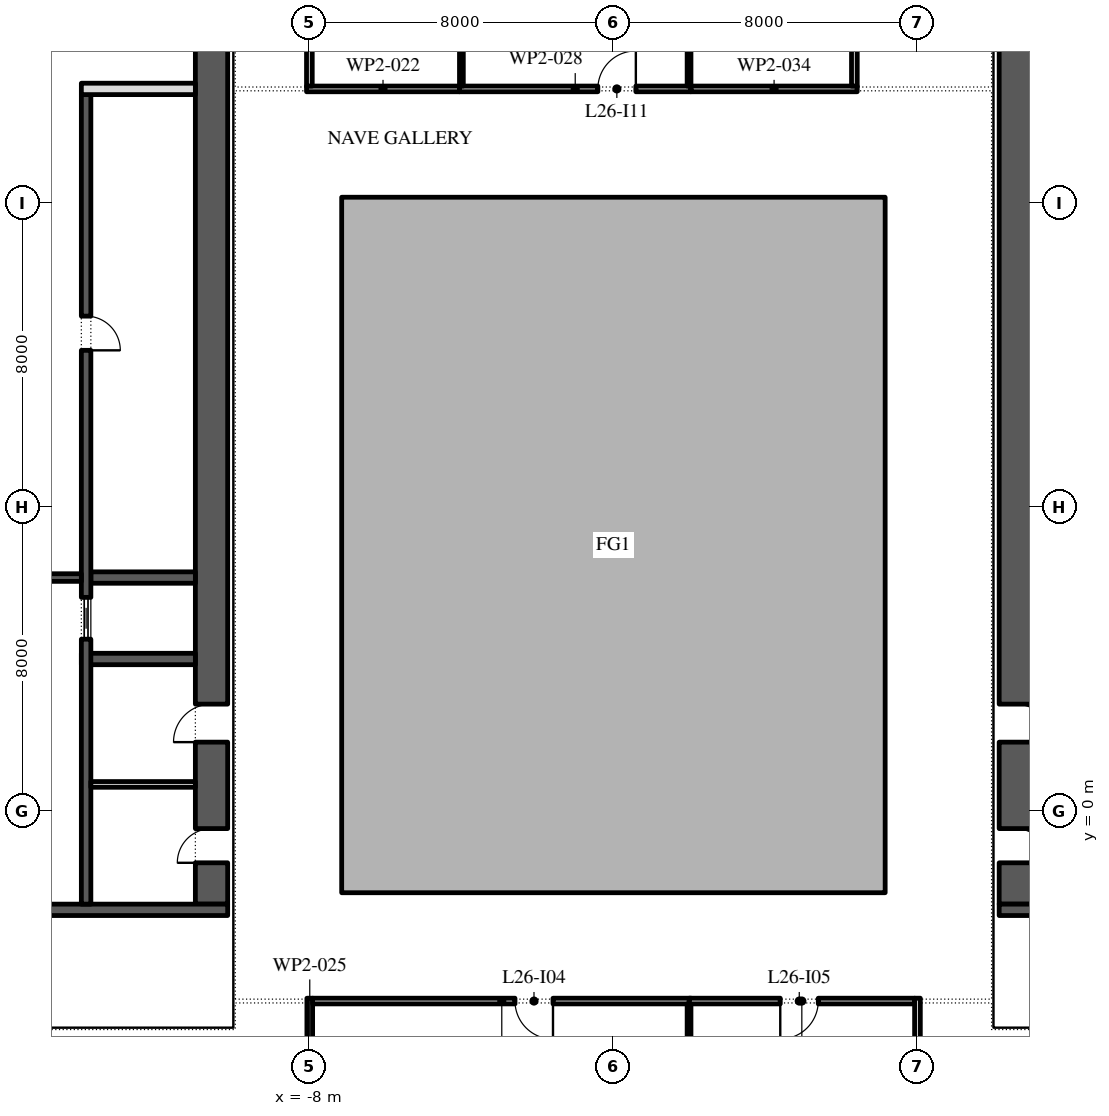
"""IFC4 building model, lengths in metres.
Left out: names, types, materials, properties, quantities, classifications, styles, units other than length and angle.
Written with IfcOpenShell. Run it as: python <this file> out.ifc"""

import sys

from ifc_helpers import new_model, si_unit, direction, frame, frame_2d, origin, place, context, subcontext, project, spatial, polyline, rectangle, outline, extrude, element, fill, save


model = new_model("IFC4")
c1 = context("Model", 3, precision=1e-05, world=origin(), true_north=direction((0.0, 1.0)))
c2 = subcontext(c1, "Body", "Model", "MODEL_VIEW")
j1 = project(units=[si_unit("LENGTHUNIT", "METRE"), si_unit("PLANEANGLEUNIT", "RADIAN")], contexts=[c1])
p1 = place(None, origin())
s1 = spatial("IfcSite", under=j1, at=p1, CompositionType="ELEMENT")
p2 = place(p1, origin())
s2 = spatial("IfcBuilding", under=s1, at=p2, CompositionType="ELEMENT")
p3 = place(p2, frame((0.0, 0.0, 122.4)))
s3 = spatial("IfcBuildingStorey", under=s2, at=p3, CompositionType="ELEMENT", Elevation=122.4)
p4 = place(p3, origin())
e1 = element("IfcWall", 1, at=p4, inside=s3, PredefinedType="STANDARD", context=c2, shape_type="SweptSolid", body=[
    extrude(outline(polyline([(-7.15, -2.15), (7.15, -2.15), (7.15, 16.15), (-7.15, 16.15), (-7.15, -2.15)]), holes=[polyline([(-7.0, -2.0), (-7.0, 16.0), (7.0, 16.0), (7.0, -2.0), (-7.0, -2.0)])]), origin(), (0.0, 0.0, 1.0), 4.0),
])
p5 = place(p3, frame((-10.575, -2.45, 0.0), z_axis=(0.0, 0.0, 1.0), x_axis=(0.0, 1.0, 0.0)))
e2 = element("IfcWall", 2, at=p5, inside=s3, PredefinedType="SHEAR", context=c2, shape_type="SweptSolid", body=[
    extrude(rectangle(XDim=27.9, YDim=0.85, at=frame_2d((13.95, 0.0))), origin(), (0.0, 0.0, 1.0), 4.0),
])
p6 = place(p5, frame((23.65, 0.0, 0.0)))
e3 = element("IfcOpeningElement", 3, at=p6, cuts=e2, PredefinedType="OPENING", context=c2, shape_type="SweptSolid", body=[
    extrude(rectangle(XDim=2.4, YDim=2.1, at=frame_2d((1.2, 1.05))), frame((0.0, 0.435, 0.0), z_axis=(0.0, -1.0, 0.0), x_axis=(1.0, 0.0, 0.0)), (0.0, 0.0, 1.0), 0.87),
])
p7 = place(p5, frame((1.087, 0.0, 0.0)))
e4 = element("IfcOpeningElement", 4, at=p7, cuts=e2, PredefinedType="OPENING", context=c2, shape_type="SweptSolid", body=[
    extrude(rectangle(XDim=0.9, YDim=2.1, at=frame_2d((0.45, 1.05))), frame((0.0, 0.435, 0.0), z_axis=(0.0, -1.0, 0.0), x_axis=(1.0, 0.0, 0.0)), (0.0, 0.0, 1.0), 0.87),
])
p8 = place(p5, frame((4.262, 0.0, 0.0)))
e5 = element("IfcOpeningElement", 5, at=p8, cuts=e2, PredefinedType="OPENING", context=c2, shape_type="SweptSolid", body=[
    extrude(rectangle(XDim=1.0, YDim=2.1, at=frame_2d((0.5, 1.05))), frame((0.0, 0.435, 0.0), z_axis=(0.0, -1.0, 0.0), x_axis=(1.0, 0.0, 0.0)), (0.0, 0.0, 1.0), 0.87),
])
p9 = place(p3, frame((-21.85, -2.6, 0.0), z_axis=(0.0, 0.0, 1.0), x_axis=(1.0, 0.0, 0.0)))
e6 = element("IfcWall", 6, at=p9, inside=s3, PredefinedType="SHEAR", context=c2, shape_type="SweptSolid", body=[
    extrude(rectangle(XDim=11.7, YDim=0.3, at=frame_2d((5.85, 0.0))), origin(), (0.0, 0.0, 1.0), 4.0),
])
p10 = place(p3, frame((-14.0, 4.0, 0.0), z_axis=(0.0, 0.0, 1.0), x_axis=(1.0, 0.0, 0.0)))
e7 = element("IfcWall", 7, at=p10, inside=s3, PredefinedType="SHEAR", context=c2, shape_type="SweptSolid", body=[
    extrude(rectangle(XDim=3.0, YDim=0.3, at=frame_2d((1.5, 0.0))), origin(), (0.0, 0.0, 1.0), 4.0),
])
p11 = place(p3, frame((-13.75, 6.143, 0.0), z_axis=(0.0, 0.0, 1.0), x_axis=(1.0, 0.0, 0.0)))
e8 = element("IfcWall", 8, at=p11, inside=s3, PredefinedType="SHEAR", context=c2, shape_type="SweptSolid", body=[
    extrude(rectangle(XDim=2.75, YDim=0.3, at=frame_2d((1.375, 0.0))), origin(), (0.0, 0.0, 1.0), 4.0),
])
p12 = place(p3, frame((-13.875, -2.45, 0.0), z_axis=(0.0, 0.0, 1.0), x_axis=(0.0, 1.0, 0.0)))
e9 = element("IfcWall", 9, at=p12, inside=s3, PredefinedType="SHEAR", context=c2, shape_type="SweptSolid", body=[
    extrude(rectangle(XDim=21.3, YDim=0.25, at=frame_2d((10.65, 0.0))), origin(), (0.0, 0.0, 1.0), 4.0),
])
p13 = place(p12, frame((14.571, 0.0, 0.0)))
e10 = element("IfcOpeningElement", 10, at=p13, cuts=e9, PredefinedType="OPENING", context=c2, shape_type="SweptSolid", body=[
    extrude(rectangle(XDim=0.9, YDim=2.1, at=frame_2d((0.45, 1.05))), frame((0.0, 0.135, 0.0), z_axis=(0.0, -1.0, 0.0), x_axis=(1.0, 0.0, 0.0)), (0.0, 0.0, 1.0), 0.27),
])
p14 = place(p12, frame((6.971, 0.0, 0.0)))
e11 = element("IfcOpeningElement", 11, at=p14, cuts=e9, PredefinedType="OPENING", context=c2, shape_type="SweptSolid", body=[
    extrude(rectangle(XDim=1.1, YDim=2.1, at=frame_2d((0.55, 1.05))), frame((0.0, 0.135, 0.0), z_axis=(0.0, -1.0, 0.0), x_axis=(1.0, 0.0, 0.0)), (0.0, 0.0, 1.0), 0.27),
])
p15 = place(p3, frame((-14.0, 19.0, 0.0), z_axis=(0.0, 0.0, 1.0), x_axis=(1.0, 0.0, 0.0)))
e12 = element("IfcWall", 12, at=p15, inside=s3, PredefinedType="PARTITIONING", context=c2, shape_type="SweptSolid", body=[
    extrude(rectangle(XDim=3.0, YDim=0.3, at=frame_2d((1.5, 0.0))), origin(), (0.0, 0.0, 1.0), 4.0),
])
p16 = place(p3, frame((-18.0, 6.143, 0.0), z_axis=(0.0, 0.0, 1.0), x_axis=(1.0, 0.0, 0.0)))
e13 = element("IfcWall", 13, at=p16, inside=s3, PredefinedType="SHEAR", context=c2, shape_type="SweptSolid", body=[
    extrude(rectangle(XDim=4.0, YDim=0.2, at=frame_2d((2.0, 0.0))), origin(), (0.0, 0.0, 1.0), 4.0),
])
p17 = place(p16, frame((1.4, 0.0, 0.0)))
e14 = element("IfcOpeningElement", 14, at=p17, cuts=e13, PredefinedType="OPENING", context=c2, shape_type="SweptSolid", body=[
    extrude(rectangle(XDim=1.2, YDim=2.1, at=frame_2d((0.6, 1.05))), frame((0.0, 0.11, 0.0), z_axis=(0.0, -1.0, 0.0), x_axis=(1.0, 0.0, 0.0)), (0.0, 0.0, 1.0), 0.22),
])
p18 = place(p3, frame((-13.75, 0.7, 0.0), z_axis=(0.0, 0.0, 1.0), x_axis=(1.0, 0.0, 0.0)))
e15 = element("IfcWall", 15, at=p18, inside=s3, PredefinedType="PARTITIONING", context=c2, shape_type="SweptSolid", body=[
    extrude(rectangle(XDim=2.75, YDim=0.15, at=frame_2d((1.375, 0.0))), origin(), (0.0, 0.0, 1.0), 4.0),
])
p19 = place(p3, frame((10.575, -2.45, 0.0), z_axis=(0.0, 0.0, 1.0), x_axis=(0.0, 1.0, 0.0)))
e16 = element("IfcWall", 16, at=p19, inside=s3, PredefinedType="SHEAR", context=c2, shape_type="SweptSolid", body=[
    extrude(rectangle(XDim=27.9, YDim=0.85, at=frame_2d((13.95, 0.0))), origin(), (0.0, 0.0, 1.0), 4.0),
])
p20 = place(p19, frame((23.65, 0.0, 0.0)))
e17 = element("IfcOpeningElement", 17, at=p20, cuts=e16, PredefinedType="OPENING", context=c2, shape_type="SweptSolid", body=[
    extrude(rectangle(XDim=2.4, YDim=2.1, at=frame_2d((1.2, 1.05))), frame((0.0, 0.435, 0.0), z_axis=(0.0, -1.0, 0.0), x_axis=(1.0, 0.0, 0.0)), (0.0, 0.0, 1.0), 0.87),
])
p21 = place(p19, frame((1.087, 0.0, 0.0)))
e18 = element("IfcOpeningElement", 18, at=p21, cuts=e16, PredefinedType="OPENING", context=c2, shape_type="SweptSolid", body=[
    extrude(rectangle(XDim=0.9, YDim=2.1, at=frame_2d((0.45, 1.05))), frame((0.0, 0.435, 0.0), z_axis=(0.0, -1.0, 0.0), x_axis=(1.0, 0.0, 0.0)), (0.0, 0.0, 1.0), 0.87),
])
p22 = place(p19, frame((4.262, 0.0, 0.0)))
e19 = element("IfcOpeningElement", 19, at=p22, cuts=e16, PredefinedType="OPENING", context=c2, shape_type="SweptSolid", body=[
    extrude(rectangle(XDim=1.0, YDim=2.1, at=frame_2d((0.5, 1.05))), frame((0.0, 0.435, 0.0), z_axis=(0.0, -1.0, 0.0), x_axis=(1.0, 0.0, 0.0)), (0.0, 0.0, 1.0), 0.87),
])
p23 = place(p3, frame((10.15, -2.6, 0.0), z_axis=(0.0, 0.0, 1.0), x_axis=(1.0, 0.0, 0.0)))
e20 = element("IfcWall", 20, at=p23, inside=s3, PredefinedType="SHEAR", context=c2, shape_type="SweptSolid", body=[
    extrude(rectangle(XDim=11.7, YDim=0.3, at=frame_2d((5.85, 0.0))), origin(), (0.0, 0.0, 1.0), 4.0),
])
p24 = place(p3, frame((-8.075, 19.0, 0.0), z_axis=(0.0, 0.0, 1.0), x_axis=(1.0, 0.0, 0.0)))
e21 = element("IfcWall", 21, at=p24, inside=s3, PredefinedType="PARTITIONING", context=c2, shape_type="SweptSolid", body=[
    extrude(rectangle(XDim=4.025, YDim=0.15, at=frame_2d((2.012, 0.0))), origin(), (0.0, 0.0, 1.0), 4.0),
])
p25 = place(p3, frame((-8.0, 27.325, 0.0), z_axis=(0.0, 0.0, 1.0), x_axis=(0.0, -1.0, 0.0)))
e22 = element("IfcWall", 22, at=p25, inside=s3, PredefinedType="PARTITIONING", context=c2, shape_type="SweptSolid", body=[
    extrude(rectangle(XDim=8.25, YDim=0.15, at=frame_2d((4.125, 0.0))), origin(), (0.0, 0.0, 1.0), 4.0),
])
p26 = place(p25, frame((2.675, 0.0, 0.0)))
e23 = element("IfcOpeningElement", 23, at=p26, cuts=e22, PredefinedType="OPENING", context=c2, shape_type="SweptSolid", body=[
    extrude(rectangle(XDim=1.0, YDim=2.1, at=frame_2d((0.5, 1.05))), frame((0.0, 0.085, 0.0), z_axis=(0.0, -1.0, 0.0), x_axis=(1.0, 0.0, 0.0)), (0.0, 0.0, 1.0), 0.17),
])
p27 = place(p3, frame((-7.99, -4.925, 0.0), z_axis=(0.0, 0.0, 1.0), x_axis=(0.0, -1.0, 0.0)))
e24 = element("IfcWall", 24, at=p27, inside=s3, PredefinedType="PARTITIONING", context=c2, shape_type="SweptSolid", body=[
    extrude(rectangle(XDim=2.69, YDim=0.15, at=frame_2d((1.345, 0.0))), origin(), (0.0, 0.0, 1.0), 4.0),
])
p28 = place(p3, frame((-4.05, 19.0, 0.0), z_axis=(0.0, 0.0, 1.0), x_axis=(1.0, 0.0, 0.0)))
e25 = element("IfcWall", 25, at=p28, inside=s3, PredefinedType="PARTITIONING", context=c2, shape_type="SweptSolid", body=[
    extrude(rectangle(XDim=6.09, YDim=0.15, at=frame_2d((3.045, 0.0))), origin(), (0.0, 0.0, 1.0), 4.0),
])
p29 = place(p28, frame((3.64, 0.0, 0.0)))
e26 = element("IfcOpeningElement", 26, at=p29, cuts=e25, PredefinedType="OPENING", context=c2, shape_type="SweptSolid", body=[
    extrude(rectangle(XDim=1.0, YDim=2.1, at=frame_2d((0.5, 1.05))), frame((0.0, 0.085, 0.0), z_axis=(0.0, -1.0, 0.0), x_axis=(1.0, 0.0, 0.0)), (0.0, 0.0, 1.0), 0.17),
])
p30 = place(p3, frame((-4.0, 33.95, 0.0), z_axis=(0.0, 0.0, 1.0), x_axis=(0.0, -1.0, 0.0)))
e27 = element("IfcWall", 27, at=p30, inside=s3, PredefinedType="PARTITIONING", context=c2, shape_type="SweptSolid", body=[
    extrude(rectangle(XDim=14.875, YDim=0.1, at=frame_2d((7.438, 0.0))), origin(), (0.0, 0.0, 1.0), 4.0),
])
p31 = place(p3, frame((2.04, -5.0, 0.0), z_axis=(0.0, 0.0, 1.0), x_axis=(-1.0, 0.0, 0.0)))
e28 = element("IfcWall", 28, at=p31, inside=s3, PredefinedType="PARTITIONING", context=c2, shape_type="SweptSolid", body=[
    extrude(rectangle(XDim=9.955, YDim=0.15, at=frame_2d((4.978, 0.0))), origin(), (0.0, 0.0, 1.0), 4.0),
])
p32 = place(p31, frame((3.63, 0.0, 0.0)))
e29 = element("IfcOpeningElement", 29, at=p32, cuts=e28, PredefinedType="OPENING", context=c2, shape_type="SweptSolid", body=[
    extrude(rectangle(XDim=1.0, YDim=2.1, at=frame_2d((0.5, 1.05))), frame((0.0, 0.085, 0.0), z_axis=(0.0, -1.0, 0.0), x_axis=(1.0, 0.0, 0.0)), (0.0, 0.0, 1.0), 0.17),
])
p33 = place(p3, frame((1.99, -5.075, 0.0), z_axis=(0.0, 0.0, 1.0), x_axis=(0.0, -1.0, 0.0)))
e30 = element("IfcWall", 30, at=p33, inside=s3, PredefinedType="PARTITIONING", context=c2, shape_type="SweptSolid", body=[
    extrude(rectangle(XDim=12.215, YDim=0.1, at=frame_2d((6.107, 0.0))), origin(), (0.0, 0.0, 1.0), 4.0),
])
p34 = place(p3, frame((2.04, 19.0, 0.0), z_axis=(0.0, 0.0, 1.0), x_axis=(1.0, 0.0, 0.0)))
e31 = element("IfcWall", 31, at=p34, inside=s3, PredefinedType="PARTITIONING", context=c2, shape_type="SweptSolid", body=[
    extrude(rectangle(XDim=4.375, YDim=0.15, at=frame_2d((2.188, 0.0))), origin(), (0.0, 0.0, 1.0), 4.0),
])
p35 = place(p3, frame((1.99, 33.95, 0.0), z_axis=(0.0, 0.0, 1.0), x_axis=(0.0, -1.0, 0.0)))
e32 = element("IfcWall", 32, at=p35, inside=s3, PredefinedType="PARTITIONING", context=c2, shape_type="SweptSolid", body=[
    extrude(rectangle(XDim=14.875, YDim=0.1, at=frame_2d((7.438, 0.0))), origin(), (0.0, 0.0, 1.0), 4.0),
])
p36 = place(p3, frame((6.34, 19.075, 0.0), z_axis=(0.0, 0.0, 1.0), x_axis=(0.0, 1.0, 0.0)))
e33 = element("IfcWall", 33, at=p36, inside=s3, PredefinedType="PARTITIONING", context=c2, shape_type="SweptSolid", body=[
    extrude(rectangle(XDim=8.39, YDim=0.15, at=frame_2d((4.195, 0.0))), origin(), (0.0, 0.0, 1.0), 4.0),
])
p37 = place(p36, frame((3.665, 0.0, 0.0)))
e34 = element("IfcOpeningElement", 34, at=p37, cuts=e33, PredefinedType="OPENING", context=c2, shape_type="SweptSolid", body=[
    extrude(rectangle(XDim=1.0, YDim=2.1, at=frame_2d((0.5, 1.05))), frame((0.0, 0.085, 0.0), z_axis=(0.0, -1.0, 0.0), x_axis=(1.0, 0.0, 0.0)), (0.0, 0.0, 1.0), 0.17),
])
p38 = place(p3, frame((8.0, -7.775, 0.0), z_axis=(0.0, 0.0, 1.0), x_axis=(0.0, 1.0, 0.0)))
e35 = element("IfcWall", 35, at=p38, inside=s3, PredefinedType="PARTITIONING", context=c2, shape_type="SweptSolid", body=[
    extrude(rectangle(XDim=2.85, YDim=0.15, at=frame_2d((1.425, 0.0))), origin(), (0.0, 0.0, 1.0), 4.0),
])
p39 = place(p3, frame((7.925, -5.0, 0.0), z_axis=(0.0, 0.0, 1.0), x_axis=(-1.0, 0.0, 0.0)))
e36 = element("IfcWall", 36, at=p39, inside=s3, PredefinedType="PARTITIONING", context=c2, shape_type="SweptSolid", body=[
    extrude(rectangle(XDim=5.935, YDim=0.15, at=frame_2d((2.968, 0.0))), origin(), (0.0, 0.0, 1.0), 4.0),
])
p40 = place(p39, frame((2.535, 0.0, 0.0)))
e37 = element("IfcOpeningElement", 37, at=p40, cuts=e36, PredefinedType="OPENING", context=c2, shape_type="SweptSolid", body=[
    extrude(rectangle(XDim=1.0, YDim=2.1, at=frame_2d((0.5, 1.05))), frame((0.0, 0.085, 0.0), z_axis=(0.0, -1.0, 0.0), x_axis=(1.0, 0.0, 0.0)), (0.0, 0.0, 1.0), 0.17),
])
p41 = place(p13, frame((0.9, -0.2, 0.0), z_axis=(0.0, 0.0, 1.0), x_axis=(-1.0, 0.0, 0.0)))
e38 = element("IfcDoor", 38, at=p41, inside=s3, OperationType="SINGLE_SWING_LEFT", PredefinedType="DOOR", context=c2, shape_type="SweptSolid", body=[
    extrude(rectangle(XDim=0.9, YDim=2.1, at=frame_2d((0.45, 1.05))), frame((0.0, -0.075, 0.0), z_axis=(0.0, -1.0, 0.0), x_axis=(1.0, 0.0, 0.0)), (0.0, 0.0, 1.0), 0.05),
])
fill(e10, e38)
p42 = place(p14, origin())
e39 = element("IfcDoor", 39, at=p42, inside=s3, OperationType="SLIDING_TO_LEFT", PredefinedType="DOOR", context=c2, shape_type="SweptSolid", body=[
    extrude(rectangle(XDim=1.1, YDim=2.1, at=frame_2d((0.55, 1.05))), frame((0.0, 0.025, 0.0), z_axis=(0.0, -1.0, 0.0), x_axis=(1.0, 0.0, 0.0)), (0.0, 0.0, 1.0), 0.05),
])
fill(e11, e39)
p43 = place(p7, origin())
e40 = element("IfcDoor", 40, at=p43, inside=s3, OperationType="SINGLE_SWING_RIGHT", PredefinedType="DOOR", context=c2, shape_type="SweptSolid", body=[
    extrude(rectangle(XDim=0.9, YDim=2.1, at=frame_2d((0.45, 1.05))), frame((0.0, 0.425, 0.0), z_axis=(0.0, -1.0, 0.0), x_axis=(1.0, 0.0, 0.0)), (0.0, 0.0, 1.0), 0.05),
])
fill(e4, e40)
p44 = place(p8, origin())
e41 = element("IfcDoor", 41, at=p44, inside=s3, OperationType="SINGLE_SWING_RIGHT", PredefinedType="DOOR", context=c2, shape_type="SweptSolid", body=[
    extrude(rectangle(XDim=1.0, YDim=2.1, at=frame_2d((0.5, 1.05))), frame((0.0, 0.425, 0.0), z_axis=(0.0, -1.0, 0.0), x_axis=(1.0, 0.0, 0.0)), (0.0, 0.0, 1.0), 0.05),
])
fill(e5, e41)
p45 = place(p21, frame((0.9, -0.8, 0.0), z_axis=(0.0, 0.0, 1.0), x_axis=(-1.0, 0.0, 0.0)))
e42 = element("IfcDoor", 42, at=p45, inside=s3, OperationType="SINGLE_SWING_LEFT", PredefinedType="DOOR", context=c2, shape_type="SweptSolid", body=[
    extrude(rectangle(XDim=0.9, YDim=2.1, at=frame_2d((0.45, 1.05))), frame((0.0, -0.375, 0.0), z_axis=(0.0, -1.0, 0.0), x_axis=(1.0, 0.0, 0.0)), (0.0, 0.0, 1.0), 0.05),
])
fill(e18, e42)
p46 = place(p22, frame((1.0, -0.8, 0.0), z_axis=(0.0, 0.0, 1.0), x_axis=(-1.0, 0.0, 0.0)))
e43 = element("IfcDoor", 43, at=p46, inside=s3, OperationType="SINGLE_SWING_LEFT", PredefinedType="DOOR", context=c2, shape_type="SweptSolid", body=[
    extrude(rectangle(XDim=1.0, YDim=2.1, at=frame_2d((0.5, 1.05))), frame((0.0, -0.375, 0.0), z_axis=(0.0, -1.0, 0.0), x_axis=(1.0, 0.0, 0.0)), (0.0, 0.0, 1.0), 0.05),
])
fill(e19, e43)
p47 = place(p32, origin())
e44 = element("IfcDoor", 44, at=p47, inside=s3, OperationType="SINGLE_SWING_RIGHT", PredefinedType="DOOR", context=c2, shape_type="SweptSolid", body=[
    extrude(rectangle(XDim=1.0, YDim=2.1, at=frame_2d((0.5, 1.05))), frame((0.0, 0.025, 0.0), z_axis=(0.0, -1.0, 0.0), x_axis=(1.0, 0.0, 0.0)), (0.0, 0.0, 1.0), 0.05),
])
fill(e29, e44)
p48 = place(p40, origin())
e45 = element("IfcDoor", 45, at=p48, inside=s3, OperationType="SINGLE_SWING_LEFT", PredefinedType="DOOR", context=c2, shape_type="SweptSolid", body=[
    extrude(rectangle(XDim=1.0, YDim=2.1, at=frame_2d((0.5, 1.05))), frame((0.0, 0.025, 0.0), z_axis=(0.0, -1.0, 0.0), x_axis=(1.0, 0.0, 0.0)), (0.0, 0.0, 1.0), 0.05),
])
fill(e37, e45)
p49 = place(p29, origin())
e46 = element("IfcDoor", 46, at=p49, inside=s3, OperationType="SINGLE_SWING_LEFT", PredefinedType="DOOR", context=c2, shape_type="SweptSolid", body=[
    extrude(rectangle(XDim=1.0, YDim=2.1, at=frame_2d((0.5, 1.05))), frame((0.0, 0.025, 0.0), z_axis=(0.0, -1.0, 0.0), x_axis=(1.0, 0.0, 0.0)), (0.0, 0.0, 1.0), 0.05),
])
fill(e26, e46)
save(model, sys.argv[1])
